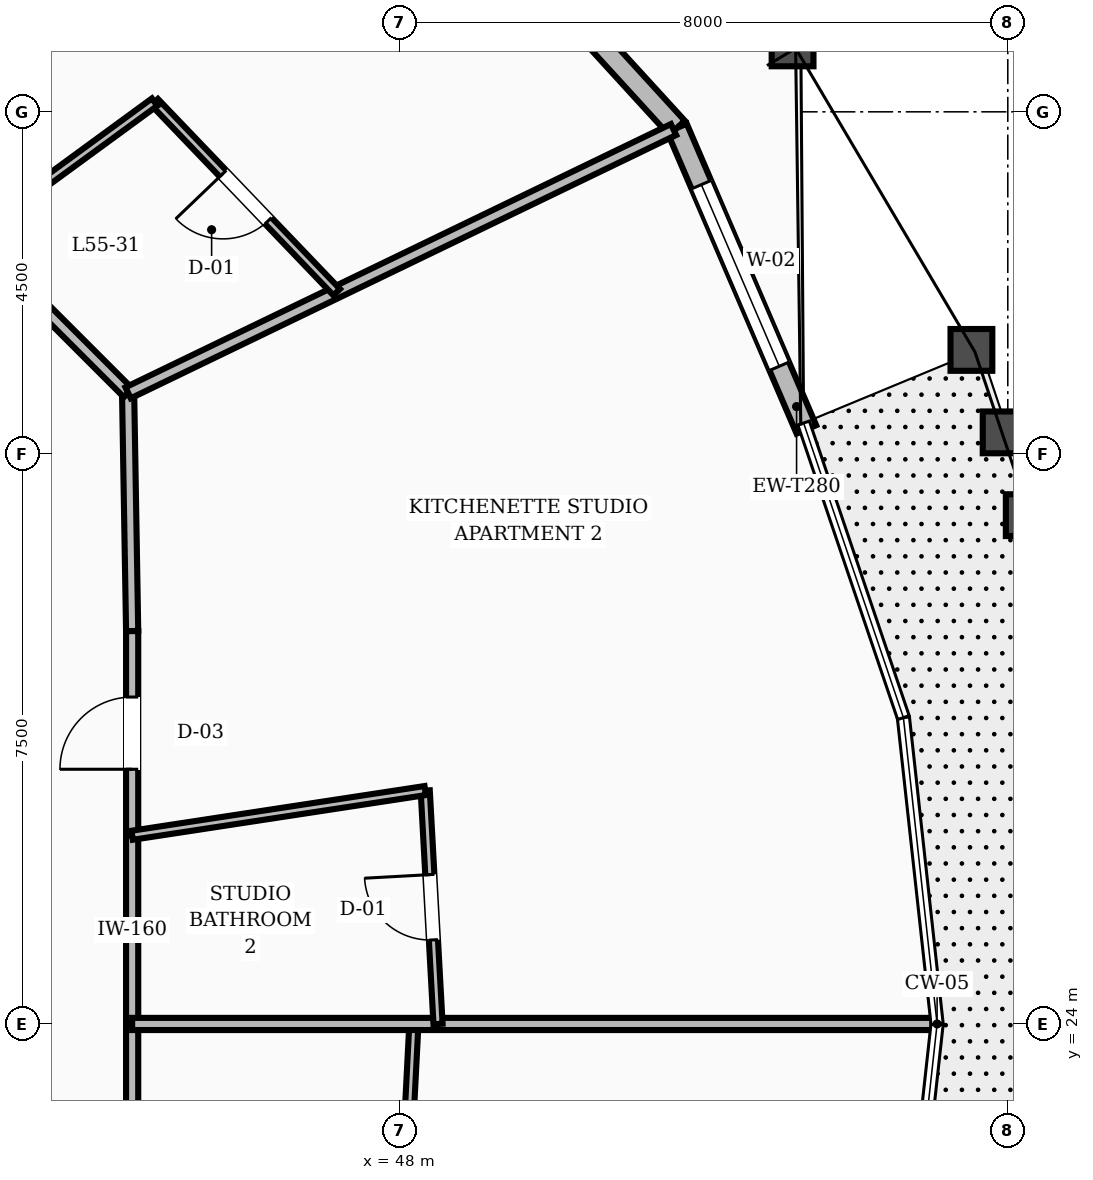
"""IFC4 building model, lengths in metres.
Left out: names, types, materials, properties, quantities, classifications, styles, units other than length and angle.
Written with IfcOpenShell. Run it as: python <this file> out.ifc"""

import sys

from ifc_helpers import new_model, si_unit, direction, frame, frame_2d, origin, place, context, subcontext, project, spatial, rectangle, extrude, element, fill, save


model = new_model("IFC4")
c1 = context("Model", 3, precision=1e-05, world=origin(), true_north=direction((0.0, 1.0)))
c2 = subcontext(c1, "Body", "Model", "MODEL_VIEW")
j1 = project(units=[si_unit("LENGTHUNIT", "METRE"), si_unit("PLANEANGLEUNIT", "RADIAN")], contexts=[c1])
p1 = place(None, origin())
s1 = spatial("IfcSite", under=j1, at=p1, CompositionType="ELEMENT")
p2 = place(p1, origin())
s2 = spatial("IfcBuilding", under=s1, at=p2, CompositionType="ELEMENT")
p3 = place(p2, frame((0.0, 0.0, 214.8)))
s3 = spatial("IfcBuildingStorey", under=s2, at=p3, CompositionType="ELEMENT", Elevation=214.8)
p4 = place(p3, frame((53.35, 31.821, 0.0), z_axis=(0.0, 0.0, 1.0), x_axis=(-0.394335596309, 0.918966505094, 0.0)))
e1 = element("IfcWall", 1, at=p4, inside=s3, PredefinedType="STANDARD", context=c2, shape_type="SweptSolid", body=[
    extrude(rectangle(XDim=4.317, YDim=0.28, at=frame_2d((2.159, 0.0))), origin(), (0.0, 0.0, 1.0), 2.88),
])
p5 = place(p4, frame((0.905, 0.0, 0.8)))
e2 = element("IfcOpeningElement", 2, at=p5, cuts=e1, PredefinedType="OPENING", context=c2, shape_type="SweptSolid", body=[
    extrude(rectangle(XDim=2.6, YDim=1.65, at=frame_2d((1.3, 0.825))), frame((0.0, 0.15, 0.0), z_axis=(0.0, -1.0, 0.0), x_axis=(1.0, 0.0, 0.0)), (0.0, 0.0, 1.0), 0.3),
])
p6 = place(p3, frame((51.648, 35.789, 0.0), z_axis=(0.0, 0.0, 1.0), x_axis=(-0.674642715371, 0.73814443478, 0.0)))
e3 = element("IfcWall", 3, at=p6, inside=s3, PredefinedType="STANDARD", context=c2, shape_type="SweptSolid", body=[
    extrude(rectangle(XDim=4.356, YDim=0.28, at=frame_2d((2.178, 0.0))), origin(), (0.0, 0.0, 1.0), 2.88),
])
p7 = place(p3, frame((44.48, 24.0, 0.0), z_axis=(0.0, 0.0, 1.0), x_axis=(0.0, 1.0, 0.0)))
e4 = element("IfcWall", 4, at=p7, inside=s3, PredefinedType="SOLIDWALL", context=c2, shape_type="SweptSolid", body=[
    extrude(rectangle(XDim=2.482, YDim=0.16, at=frame_2d((1.241, 0.0))), origin(), (0.0, 0.0, 1.0), 2.87),
])
p8 = place(p3, frame((44.48, 26.482, 0.0), z_axis=(0.0, 0.0, 1.0), x_axis=(0.0, 1.0, 0.0)))
e5 = element("IfcWall", 5, at=p8, inside=s3, PredefinedType="SOLIDWALL", context=c2, shape_type="SweptSolid", body=[
    extrude(rectangle(XDim=2.687, YDim=0.16, at=frame_2d((1.344, 0.0))), origin(), (0.0, 0.0, 1.0), 2.87),
])
p9 = place(p8, frame((0.868, 0.0, 0.0)))
e6 = element("IfcOpeningElement", 6, at=p9, cuts=e5, PredefinedType="OPENING", context=c2, shape_type="SweptSolid", body=[
    extrude(rectangle(XDim=0.95, YDim=2.1, at=frame_2d((0.475, 1.05))), frame((0.0, 0.09, 0.0), z_axis=(0.0, -1.0, 0.0), x_axis=(1.0, 0.0, 0.0)), (0.0, 0.0, 1.0), 0.18),
])
p10 = place(p3, frame((44.48, 29.169, 0.0), z_axis=(0.0, 0.0, 1.0), x_axis=(-0.016981035134, 0.999855811828, 0.0)))
e7 = element("IfcWall", 7, at=p10, inside=s3, PredefinedType="SOLIDWALL", context=c2, shape_type="SweptSolid", body=[
    extrude(rectangle(XDim=3.134, YDim=0.16, at=frame_2d((1.567, 0.0))), origin(), (0.0, 0.0, 1.0), 2.87),
])
p11 = place(p3, frame((44.427, 32.303, 0.0), z_axis=(0.0, 0.0, 1.0), x_axis=(-0.707106781187, 0.707106781187, 0.0)))
e8 = element("IfcWall", 8, at=p11, inside=s3, PredefinedType="SOLIDWALL", context=c2, shape_type="SweptSolid", body=[
    extrude(rectangle(XDim=2.916, YDim=0.16, at=frame_2d((1.458, 0.0))), origin(), (0.0, 0.0, 1.0), 2.87),
])
p12 = place(p3, frame((44.48, 21.518, 0.0), z_axis=(0.0, 0.0, 1.0), x_axis=(0.0, 1.0, 0.0)))
e9 = element("IfcWall", 9, at=p12, inside=s3, PredefinedType="SOLIDWALL", context=c2, shape_type="SweptSolid", body=[
    extrude(rectangle(XDim=2.482, YDim=0.16, at=frame_2d((1.241, 0.0))), origin(), (0.0, 0.0, 1.0), 2.87),
])
p13 = place(p3, frame((48.031, 20.976, 0.0), z_axis=(0.0, 0.0, 1.0), x_axis=(0.051276607355, 0.998684489485, 0.0)))
e10 = element("IfcWall", 10, at=p13, inside=s3, PredefinedType="PARTITIONING", context=c2, shape_type="SweptSolid", body=[
    extrude(rectangle(XDim=3.028, YDim=0.12, at=frame_2d((1.514, 0.0))), origin(), (0.0, 0.0, 1.0), 2.87),
])
p14 = place(p3, frame((44.48, 24.0, 0.0), z_axis=(0.0, 0.0, 1.0), x_axis=(1.0, 0.0, 0.0)))
e11 = element("IfcWall", 11, at=p14, inside=s3, PredefinedType="SOLIDWALL", context=c2, shape_type="SweptSolid", body=[
    extrude(rectangle(XDim=10.54, YDim=0.16, at=frame_2d((5.27, 0.0))), origin(), (0.0, 0.0, 1.0), 2.87),
])
p15 = place(p3, frame((48.504, 24.0, 0.0), z_axis=(0.0, 0.0, 1.0), x_axis=(-0.054779672564, 0.998498466435, 0.0)))
e12 = element("IfcWall", 12, at=p15, inside=s3, PredefinedType="PARTITIONING", context=c2, shape_type="SweptSolid", body=[
    extrude(rectangle(XDim=3.075, YDim=0.12, at=frame_2d((1.538, 0.0))), origin(), (0.0, 0.0, 1.0), 2.87),
])
p16 = place(p15, frame((1.108, 0.0, 0.0)))
e13 = element("IfcOpeningElement", 13, at=p16, cuts=e12, PredefinedType="OPENING", context=c2, shape_type="SweptSolid", body=[
    extrude(rectangle(XDim=0.86, YDim=2.1, at=frame_2d((0.43, 1.05))), frame((0.0, 0.07, 0.0), z_axis=(0.0, -1.0, 0.0), x_axis=(1.0, 0.0, 0.0)), (0.0, 0.0, 1.0), 0.14),
])
p17 = place(p3, frame((44.48, 26.482, 0.0), z_axis=(0.0, 0.0, 1.0), x_axis=(0.988565547882, 0.150791768812, 0.0)))
e14 = element("IfcWall", 14, at=p17, inside=s3, PredefinedType="PARTITIONING", context=c2, shape_type="SweptSolid", body=[
    extrude(rectangle(XDim=3.9, YDim=0.12, at=frame_2d((1.95, 0.0))), origin(), (0.0, 0.0, 1.0), 2.87),
])
p18 = place(p3, frame((44.427, 32.303, 0.0), z_axis=(0.0, 0.0, 1.0), x_axis=(0.900578522431, 0.434693368867, 0.0)))
e15 = element("IfcWall", 15, at=p18, inside=s3, PredefinedType="SOLIDWALL", context=c2, shape_type="SweptSolid", body=[
    extrude(rectangle(XDim=7.968, YDim=0.16, at=frame_2d((3.984, 0.0))), origin(), (0.0, 0.0, 1.0), 2.87),
])
p19 = place(p3, frame((47.171, 33.628, 0.0), z_axis=(0.0, 0.0, 1.0), x_axis=(-0.691782824038, 0.722105618567, 0.0)))
e16 = element("IfcWall", 16, at=p19, inside=s3, PredefinedType="PARTITIONING", context=c2, shape_type="SweptSolid", body=[
    extrude(rectangle(XDim=3.462, YDim=0.12, at=frame_2d((1.731, 0.0))), origin(), (0.0, 0.0, 1.0), 2.87),
])
p20 = place(p19, frame((1.301, 0.0, 0.0)))
e17 = element("IfcOpeningElement", 17, at=p20, cuts=e16, PredefinedType="OPENING", context=c2, shape_type="SweptSolid", body=[
    extrude(rectangle(XDim=0.86, YDim=2.1, at=frame_2d((0.43, 1.05))), frame((0.0, 0.07, 0.0), z_axis=(0.0, -1.0, 0.0), x_axis=(1.0, 0.0, 0.0)), (0.0, 0.0, 1.0), 0.14),
])
p21 = place(p3, frame((42.365, 34.365, 0.0), z_axis=(0.0, 0.0, 1.0), x_axis=(0.807220331386, 0.590250232187, 0.0)))
e18 = element("IfcWall", 18, at=p21, inside=s3, PredefinedType="PARTITIONING", context=c2, shape_type="SweptSolid", body=[
    extrude(rectangle(XDim=2.986, YDim=0.12, at=frame_2d((1.493, 0.0))), origin(), (0.0, 0.0, 1.0), 2.87),
])
p22 = place(p5, origin())
e19 = element("IfcWindow", 19, at=p22, inside=s3, PartitioningType="SINGLE_PANEL", PredefinedType="WINDOW", context=c2, shape_type="SweptSolid", body=[
    extrude(rectangle(XDim=2.6, YDim=1.65, at=frame_2d((1.3, 0.825))), frame((0.0, 0.03, 0.0), z_axis=(0.0, -1.0, 0.0), x_axis=(1.0, 0.0, 0.0)), (0.0, 0.0, 1.0), 0.06),
])
fill(e2, e19)
p23 = place(p16, origin())
e20 = element("IfcDoor", 20, at=p23, inside=s3, OperationType="SINGLE_SWING_RIGHT", PredefinedType="DOOR", context=c2, shape_type="SweptSolid", body=[
    extrude(rectangle(XDim=0.86, YDim=2.1, at=frame_2d((0.43, 1.05))), frame((0.0, 0.025, 0.0), z_axis=(0.0, -1.0, 0.0), x_axis=(1.0, 0.0, 0.0)), (0.0, 0.0, 1.0), 0.05),
])
fill(e13, e20)
p24 = place(p9, origin())
e21 = element("IfcDoor", 21, at=p24, inside=s3, OperationType="SINGLE_SWING_LEFT", PredefinedType="DOOR", context=c2, shape_type="SweptSolid", body=[
    extrude(rectangle(XDim=0.95, YDim=2.1, at=frame_2d((0.475, 1.05))), frame((0.0, 0.025, 0.0), z_axis=(0.0, -1.0, 0.0), x_axis=(1.0, 0.0, 0.0)), (0.0, 0.0, 1.0), 0.05),
])
fill(e6, e21)
p25 = place(p20, origin())
e22 = element("IfcDoor", 22, at=p25, inside=s3, OperationType="SINGLE_SWING_RIGHT", PredefinedType="DOOR", context=c2, shape_type="SweptSolid", body=[
    extrude(rectangle(XDim=0.86, YDim=2.1, at=frame_2d((0.43, 1.05))), frame((0.0, 0.025, 0.0), z_axis=(0.0, -1.0, 0.0), x_axis=(1.0, 0.0, 0.0)), (0.0, 0.0, 1.0), 0.05),
])
fill(e17, e22)
save(model, sys.argv[1])
